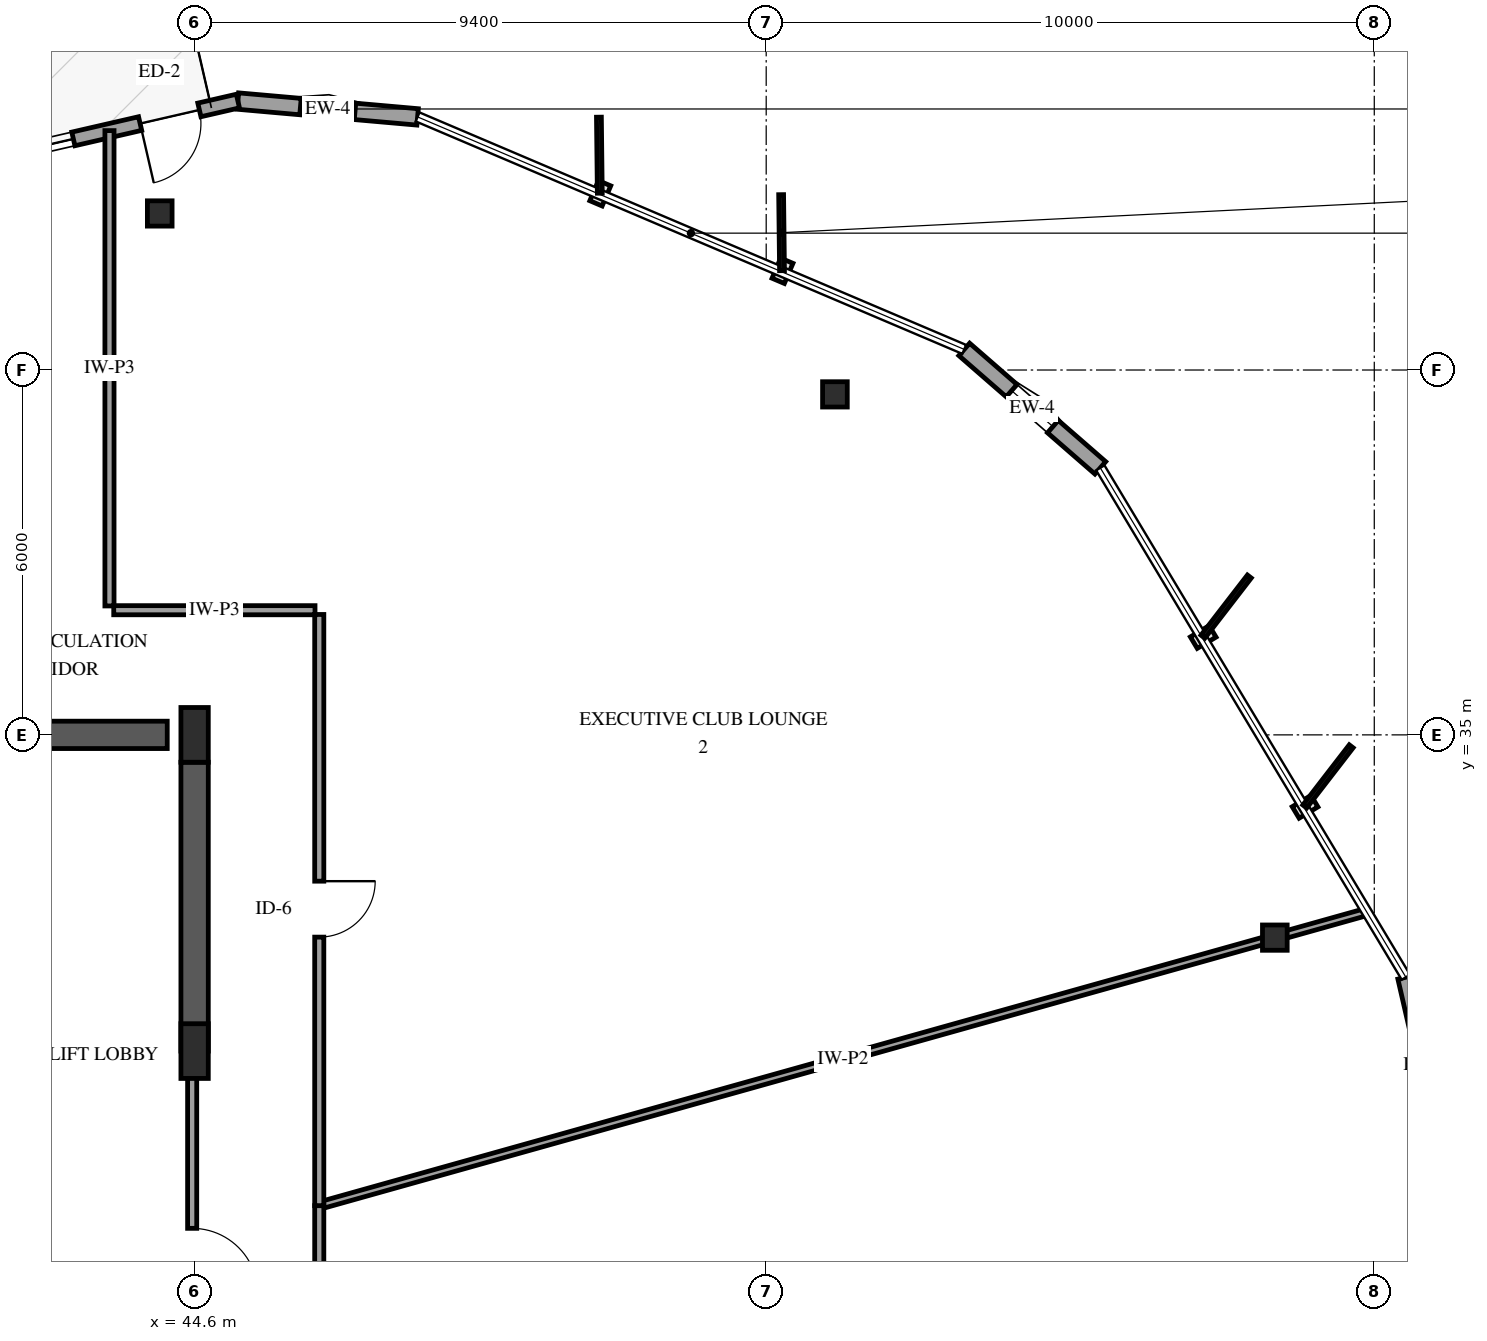
"""IFC4 building model, lengths in metres.
Left out: names, types, materials, properties, quantities, classifications, styles, units other than length and angle.
Written with IfcOpenShell. Run it as: python <this file> out.ifc"""

import sys

from ifc_helpers import new_model, si_unit, direction, frame, frame_2d, origin, origin_2d, place, context, subcontext, project, spatial, rectangle, i_section, extrude, element, fill, save


model = new_model("IFC4")
c1 = context("Model", 3, precision=1e-05, world=origin(), true_north=direction((0.0, 1.0)))
c2 = subcontext(c1, "Body", "Model", "MODEL_VIEW")
j1 = project(units=[si_unit("LENGTHUNIT", "METRE"), si_unit("PLANEANGLEUNIT", "RADIAN")], contexts=[c1])
p1 = place(None, origin())
s1 = spatial("IfcSite", under=j1, at=p1, CompositionType="ELEMENT")
p2 = place(p1, origin())
s2 = spatial("IfcBuilding", under=s1, at=p2, CompositionType="ELEMENT")
p3 = place(p2, frame((0.0, 0.0, 212.2)))
s3 = spatial("IfcBuildingStorey", under=s2, at=p3, CompositionType="ELEMENT", Elevation=212.2)
p4 = place(p3, frame((41.3, 35.0, 0.0), z_axis=(0.0, 0.0, 1.0), x_axis=(1.0, 0.0, 0.0)))
e1 = element("IfcWall", 1, at=p4, inside=s3, PredefinedType="SHEAR", context=c2, shape_type="SweptSolid", body=[
    extrude(rectangle(XDim=2.85, YDim=0.45, at=frame_2d((1.425, 0.0))), origin(), (0.0, 0.0, 1.0), 3.6),
])
p5 = place(p3, frame((44.6, 29.8, 0.0), z_axis=(0.0, 0.0, 1.0), x_axis=(0.0, 1.0, 0.0)))
e2 = element("IfcWall", 2, at=p5, inside=s3, PredefinedType="SHEAR", context=c2, shape_type="SweptSolid", body=[
    extrude(rectangle(XDim=4.75, YDim=0.45, at=frame_2d((2.375, 0.0))), origin(), (0.0, 0.0, 1.0), 3.6),
])
for number, where, z_axis, x_axis in (
    (3, (44.6, 29.8, 0.0), (0.0, 0.0, 1.0), (1.0, 0.0, 0.0)),
    (4, (44.6, 35.0, 0.0), (0.0, 0.0, 1.0), (1.0, 0.0, 0.0)),
):
    element("IfcColumn", number, at=place(p3, frame(where, z_axis=z_axis, x_axis=x_axis)), inside=s3, PredefinedType="PILASTER", context=c2, shape_type="SweptSolid", body=[
        extrude(rectangle(XDim=0.45, YDim=0.9, at=origin_2d()), origin(), (0.0, 0.0, 1.0), 3.6),
    ])
for number, where, z_axis, x_axis in (
    (5, (62.365, 31.666, 0.0), (0.0, 0.0, 1.0), (1.0, 0.0, 0.0)),
    (6, (55.13, 40.599, 0.0), (0.0, 0.0, 1.0), (1.0, 0.0, 0.0)),
    (7, (44.027, 43.574, 0.0), (0.0, 0.0, 1.0), (1.0, 0.0, 0.0)),
):
    element("IfcColumn", number, at=place(p3, frame(where, z_axis=z_axis, x_axis=x_axis)), inside=s3, PredefinedType="COLUMN", context=c2, shape_type="SweptSolid", body=[
        extrude(i_section(OverallWidth=0.406, OverallDepth=0.416, WebThickness=0.03, FlangeThickness=0.048, FilletRadius=0.038, at=origin_2d()), origin(), (0.0, 0.0, 1.0), 3.6),
    ])
p6 = place(p3, frame((48.267, 45.162, 0.0), z_axis=(0.0, 0.0, 1.0), x_axis=(-0.996129850025, 0.087893810296, 0.0)))
e8 = element("IfcWall", 8, at=p6, inside=s3, PredefinedType="SOLIDWALL", context=c2, shape_type="SweptSolid", body=[
    extrude(rectangle(XDim=2.967, YDim=0.27, at=frame_2d((1.483, 0.0))), origin(), (0.0, 0.0, 1.0), 2.679),
])
p7 = place(p6, frame((1.033, 0.0, 0.75)))
e9 = element("IfcOpeningElement", 9, at=p7, cuts=e8, PredefinedType="OPENING", context=c2, shape_type="SweptSolid", body=[
    extrude(rectangle(XDim=0.9, YDim=1.5, at=frame_2d((0.45, 0.75))), frame((0.0, 0.145, 0.0), z_axis=(0.0, -1.0, 0.0), x_axis=(1.0, 0.0, 0.0)), (0.0, 0.0, 1.0), 0.29),
])
p8 = place(p3, frame((45.312, 45.423, 0.0), z_axis=(0.0, 0.0, 1.0), x_axis=(-0.974525807261, -0.224275390941, 0.0)))
e10 = element("IfcWall", 10, at=p8, inside=s3, PredefinedType="SOLIDWALL", context=c2, shape_type="SweptSolid", body=[
    extrude(rectangle(XDim=9.769, YDim=0.23, at=frame_2d((4.884, 0.0))), origin(), (0.0, 0.0, 1.0), 2.679),
])
p9 = place(p8, frame((0.65, 0.0, 0.0)))
e11 = element("IfcOpeningElement", 11, at=p9, cuts=e10, PredefinedType="OPENING", context=c2, shape_type="SweptSolid", body=[
    extrude(rectangle(XDim=1.0, YDim=2.15, at=frame_2d((0.5, 1.075))), frame((0.0, 0.125, 0.0), z_axis=(0.0, -1.0, 0.0), x_axis=(1.0, 0.0, 0.0)), (0.0, 0.0, 1.0), 0.25),
])
p10 = place(p8, frame((2.777, 0.0, 0.72)))
e12 = element("IfcOpeningElement", 12, at=p10, cuts=e10, PredefinedType="OPENING", context=c2, shape_type="SweptSolid", body=[
    extrude(rectangle(XDim=1.2, YDim=1.6, at=frame_2d((0.6, 0.8))), frame((0.0, 0.125, 0.0), z_axis=(0.0, -1.0, 0.0), x_axis=(1.0, 0.0, 0.0)), (0.0, 0.0, 1.0), 0.25),
])
p11 = place(p3, frame((65.185, 28.123, 0.0), z_axis=(0.0, 0.0, 1.0), x_axis=(-0.224270411894, 0.974526953116, 0.0)))
e13 = element("IfcWall", 13, at=p11, inside=s3, PredefinedType="SOLIDWALL", context=c2, shape_type="SweptSolid", body=[
    extrude(rectangle(XDim=2.967, YDim=0.27, at=frame_2d((1.483, 0.0))), origin(), (0.0, 0.0, 1.0), 2.679),
])
p12 = place(p11, frame((1.033, 0.0, 0.75)))
e14 = element("IfcOpeningElement", 14, at=p12, cuts=e13, PredefinedType="OPENING", context=c2, shape_type="SweptSolid", body=[
    extrude(rectangle(XDim=0.9, YDim=1.5, at=frame_2d((0.45, 0.75))), frame((0.0, 0.145, 0.0), z_axis=(0.0, -1.0, 0.0), x_axis=(1.0, 0.0, 0.0)), (0.0, 0.0, 1.0), 0.29),
])
p13 = place(p3, frame((59.494, 39.391, 0.0), z_axis=(0.0, 0.0, 1.0), x_axis=(-0.754261698008, 0.656573903623, 0.0)))
e15 = element("IfcWall", 15, at=p13, inside=s3, PredefinedType="SOLIDWALL", context=c2, shape_type="SweptSolid", body=[
    extrude(rectangle(XDim=2.967, YDim=0.27, at=frame_2d((1.483, 0.0))), origin(), (0.0, 0.0, 1.0), 2.679),
])
p14 = place(p13, frame((1.033, 0.0, 0.75)))
e16 = element("IfcOpeningElement", 16, at=p14, cuts=e15, PredefinedType="OPENING", context=c2, shape_type="SweptSolid", body=[
    extrude(rectangle(XDim=0.9, YDim=1.5, at=frame_2d((0.45, 0.75))), frame((0.0, 0.145, 0.0), z_axis=(0.0, -1.0, 0.0), x_axis=(1.0, 0.0, 0.0)), (0.0, 0.0, 1.0), 0.29),
])
p15 = place(p3, frame((63.875, 32.089, 0.0), z_axis=(0.0, 0.0, 1.0), x_axis=(-0.962847424489, -0.270045990813, 0.0)))
e17 = element("IfcWall", 17, at=p15, inside=s3, PredefinedType="PARTITIONING", context=c2, shape_type="SweptSolid", body=[
    extrude(rectangle(XDim=17.89, YDim=0.12, at=frame_2d((8.945, 0.0))), origin(), (0.0, 0.0, 1.0), 3.3),
])
p16 = place(p3, frame((46.65, 27.258, 0.0), z_axis=(0.0, 0.0, 1.0), x_axis=(0.0, -1.0, 0.0)))
e18 = element("IfcWall", 18, at=p16, inside=s3, PredefinedType="PARTITIONING", context=c2, shape_type="SweptSolid", body=[
    extrude(rectangle(XDim=14.238, YDim=0.15, at=frame_2d((7.119, 0.0))), origin(), (0.0, 0.0, 1.0), 3.3),
])
p17 = place(p16, frame((6.644, 0.0, 0.0)))
e19 = element("IfcOpeningElement", 19, at=p17, cuts=e18, PredefinedType="OPENING", context=c2, shape_type="SweptSolid", body=[
    extrude(rectangle(XDim=0.92, YDim=2.12, at=frame_2d((0.46, 1.06))), frame((0.0, 0.085, 0.0), z_axis=(0.0, -1.0, 0.0), x_axis=(1.0, 0.0, 0.0)), (0.0, 0.0, 1.0), 0.17),
])
p18 = place(p3, frame((46.65, 36.98, 0.0), z_axis=(0.0, 0.0, 1.0), x_axis=(0.0, -1.0, 0.0)))
e20 = element("IfcWall", 20, at=p18, inside=s3, PredefinedType="PARTITIONING", context=c2, shape_type="SweptSolid", body=[
    extrude(rectangle(XDim=9.722, YDim=0.15, at=frame_2d((4.861, 0.0))), origin(), (0.0, 0.0, 1.0), 3.3),
])
p19 = place(p18, frame((4.386, 0.0, 0.0)))
e21 = element("IfcOpeningElement", 21, at=p19, cuts=e20, PredefinedType="OPENING", context=c2, shape_type="SweptSolid", body=[
    extrude(rectangle(XDim=0.92, YDim=2.12, at=frame_2d((0.46, 1.06))), frame((0.0, 0.085, 0.0), z_axis=(0.0, -1.0, 0.0), x_axis=(1.0, 0.0, 0.0)), (0.0, 0.0, 1.0), 0.17),
])
p20 = place(p3, frame((43.2, 44.937, 0.0), z_axis=(0.0, 0.0, 1.0), x_axis=(0.0, -1.0, 0.0)))
e22 = element("IfcWall", 22, at=p20, inside=s3, PredefinedType="PARTITIONING", context=c2, shape_type="SweptSolid", body=[
    extrude(rectangle(XDim=7.817, YDim=0.15, at=frame_2d((3.908, 0.0))), origin(), (0.0, 0.0, 1.0), 2.595),
])
p21 = place(p3, frame((44.56, 29.8, 0.0), z_axis=(0.0, 0.0, 1.0), x_axis=(0.0, -1.0, 0.0)))
e23 = element("IfcWall", 23, at=p21, inside=s3, PredefinedType="PARTITIONING", context=c2, shape_type="SweptSolid", body=[
    extrude(rectangle(XDim=6.91, YDim=0.15, at=frame_2d((3.455, 0.0))), origin(), (0.0, 0.0, 1.0), 2.34),
])
p22 = place(p21, frame((2.915, 0.0, 0.0)))
e24 = element("IfcOpeningElement", 24, at=p22, cuts=e23, PredefinedType="OPENING", context=c2, shape_type="SweptSolid", body=[
    extrude(rectangle(XDim=1.08, YDim=2.15, at=frame_2d((0.54, 1.075))), frame((0.0, 0.085, 0.0), z_axis=(0.0, -1.0, 0.0), x_axis=(1.0, 0.0, 0.0)), (0.0, 0.0, 1.0), 0.17),
])
p23 = place(p3, frame((43.27, 37.05, 0.0), z_axis=(0.0, 0.0, 1.0), x_axis=(1.0, 0.0, 0.0)))
e25 = element("IfcWall", 25, at=p23, inside=s3, PredefinedType="PARTITIONING", context=c2, shape_type="SweptSolid", body=[
    extrude(rectangle(XDim=3.31, YDim=0.15, at=frame_2d((1.655, 0.0))), origin(), (0.0, 0.0, 1.0), 3.3),
])
p24 = place(p7, origin())
e26 = element("IfcWindow", 26, at=p24, inside=s3, PartitioningType="SINGLE_PANEL", PredefinedType="WINDOW", context=c2, shape_type="SweptSolid", body=[
    extrude(rectangle(XDim=0.9, YDim=1.5, at=frame_2d((0.45, 0.75))), frame((0.0, 0.03, 0.0), z_axis=(0.0, -1.0, 0.0), x_axis=(1.0, 0.0, 0.0)), (0.0, 0.0, 1.0), 0.06),
])
fill(e9, e26)
p25 = place(p9, origin())
e27 = element("IfcDoor", 27, at=p25, inside=s3, OperationType="SINGLE_SWING_RIGHT", PredefinedType="DOOR", context=c2, shape_type="SweptSolid", body=[
    extrude(rectangle(XDim=1.0, YDim=2.15, at=frame_2d((0.5, 1.075))), frame((0.0, 0.025, 0.0), z_axis=(0.0, -1.0, 0.0), x_axis=(1.0, 0.0, 0.0)), (0.0, 0.0, 1.0), 0.05),
])
fill(e11, e27)
p26 = place(p10, origin())
e28 = element("IfcWindow", 28, at=p26, inside=s3, PartitioningType="SINGLE_PANEL", PredefinedType="WINDOW", context=c2, shape_type="SweptSolid", body=[
    extrude(rectangle(XDim=1.2, YDim=1.6, at=frame_2d((0.6, 0.8))), frame((0.0, 0.03, 0.0), z_axis=(0.0, -1.0, 0.0), x_axis=(1.0, 0.0, 0.0)), (0.0, 0.0, 1.0), 0.06),
])
fill(e12, e28)
p27 = place(p14, origin())
e29 = element("IfcWindow", 29, at=p27, inside=s3, PartitioningType="SINGLE_PANEL", PredefinedType="WINDOW", context=c2, shape_type="SweptSolid", body=[
    extrude(rectangle(XDim=0.9, YDim=1.5, at=frame_2d((0.45, 0.75))), frame((0.0, 0.03, 0.0), z_axis=(0.0, -1.0, 0.0), x_axis=(1.0, 0.0, 0.0)), (0.0, 0.0, 1.0), 0.06),
])
fill(e16, e29)
p28 = place(p19, origin())
e30 = element("IfcDoor", 30, at=p28, inside=s3, OperationType="SINGLE_SWING_LEFT", PredefinedType="DOOR", context=c2, shape_type="SweptSolid", body=[
    extrude(rectangle(XDim=0.92, YDim=2.12, at=frame_2d((0.46, 1.06))), frame((0.0, 0.025, 0.0), z_axis=(0.0, -1.0, 0.0), x_axis=(1.0, 0.0, 0.0)), (0.0, 0.0, 1.0), 0.05),
])
fill(e21, e30)
p29 = place(p22, origin())
e31 = element("IfcDoor", 31, at=p29, inside=s3, OperationType="SINGLE_SWING_RIGHT", PredefinedType="DOOR", context=c2, shape_type="SweptSolid", body=[
    extrude(rectangle(XDim=1.08, YDim=2.15, at=frame_2d((0.54, 1.075))), frame((0.0, 0.025, 0.0), z_axis=(0.0, -1.0, 0.0), x_axis=(1.0, 0.0, 0.0)), (0.0, 0.0, 1.0), 0.05),
])
fill(e24, e31)
save(model, sys.argv[1])
